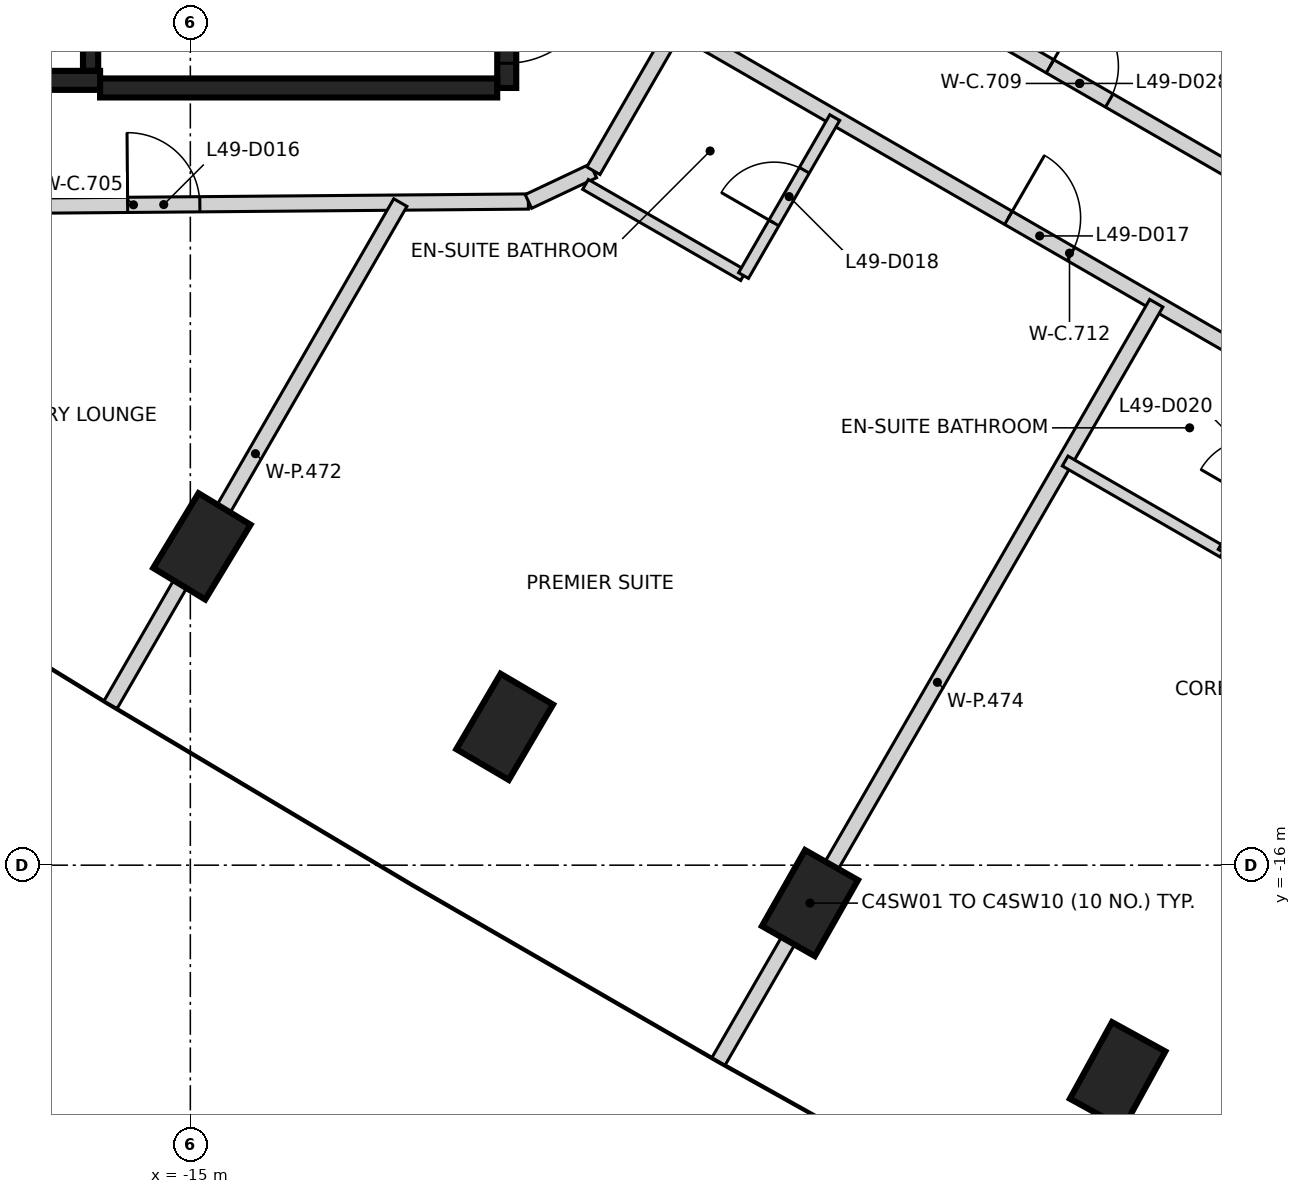
"""IFC4 building model, lengths in metres.
Left out: names, types, materials, properties, quantities, classifications, styles, units other than length and angle.
Written with IfcOpenShell. Run it as: python <this file> out.ifc"""

import sys

from ifc_helpers import new_model, si_unit, direction, frame, frame_2d, origin, origin_2d, place, context, subcontext, project, spatial, rectangle, extrude, element, fill, save


model = new_model("IFC4")
c1 = context("Model", 3, precision=1e-05, world=origin(), true_north=direction((0.0, 1.0)))
c2 = subcontext(c1, "Body", "Model", "MODEL_VIEW")
j1 = project(units=[si_unit("LENGTHUNIT", "METRE"), si_unit("PLANEANGLEUNIT", "RADIAN")], contexts=[c1])
p1 = place(None, origin())
s1 = spatial("IfcSite", under=j1, at=p1, CompositionType="ELEMENT")
p2 = place(p1, origin())
s2 = spatial("IfcBuilding", under=s1, at=p2, CompositionType="ELEMENT")
p3 = place(p2, frame((0.0, 0.0, 197.2)))
s3 = spatial("IfcBuildingStorey", under=s2, at=p3, CompositionType="ELEMENT", Elevation=197.2)
for number, where, z_axis, x_axis in (
    (1, (-14.848, -11.806, -0.35), (0.0, 0.0, 1.0), (0.518, 0.855, 0.0)),
    (2, (-10.864, -14.18, -0.35), (0.0, 0.0, 1.0), (0.506, 0.862, 0.0)),
    (3, (-6.848, -16.499, -0.35), (0.0, 0.0, 1.0), (0.494, 0.87, 0.0)),
    (4, (-2.8, -18.762, -0.35), (0.0, 0.0, 1.0), (0.482, 0.876, 0.0)),
):
    element("IfcColumn", number, at=place(p3, frame(where, z_axis=z_axis, x_axis=x_axis)), inside=s3, PredefinedType="COLUMN", context=c2, shape_type="SweptSolid", body=[
        extrude(rectangle(XDim=1.15, YDim=0.8, at=origin_2d()), origin(), (0.0, 0.0, 1.0), 3.6),
    ])
p4 = place(p3, frame((-10.837, 5.775, 0.0), z_axis=(0.0, 0.0, 1.0), x_axis=(0.0, -1.0, 0.0)))
e5 = element("IfcWall", 5, at=p4, inside=s3, PredefinedType="SHEAR", context=c2, shape_type="SweptSolid", body=[
    extrude(rectangle(XDim=11.55, YDim=0.25, at=frame_2d((5.775, 0.0))), origin(), (0.0, 0.0, 1.0), 3.25),
])
p5 = place(p4, frame((10.025, 0.0, 0.0)))
e6 = element("IfcOpeningElement", 6, at=p5, cuts=e5, PredefinedType="OPENING", context=c2, shape_type="SweptSolid", body=[
    extrude(rectangle(XDim=1.2, YDim=2.1, at=frame_2d((0.6, 1.05))), frame((0.0, 0.135, 0.0), z_axis=(0.0, -1.0, 0.0), x_axis=(1.0, 0.0, 0.0)), (0.0, 0.0, 1.0), 0.27),
])
p6 = place(p4, frame((8.725, 0.0, 0.0)))
e7 = element("IfcOpeningElement", 7, at=p6, cuts=e5, PredefinedType="OPENING", context=c2, shape_type="SweptSolid", body=[
    extrude(rectangle(XDim=1.2, YDim=2.1, at=frame_2d((0.6, 1.05))), frame((0.0, 0.135, 0.0), z_axis=(0.0, -1.0, 0.0), x_axis=(1.0, 0.0, 0.0)), (0.0, 0.0, 1.0), 0.27),
])
p7 = place(p3, frame((-16.187, -5.675, 0.0), z_axis=(0.0, 0.0, 1.0), x_axis=(-1.0, 0.0, 0.0)))
e8 = element("IfcWall", 8, at=p7, inside=s3, PredefinedType="SHEAR", context=c2, shape_type="SweptSolid", body=[
    extrude(rectangle(XDim=6.125, YDim=0.25, at=frame_2d((3.062, 0.0))), origin(), (0.0, 0.0, 1.0), 3.25),
])
p8 = place(p7, frame((3.563, 0.0, 0.0)))
e9 = element("IfcOpeningElement", 9, at=p8, cuts=e8, PredefinedType="OPENING", context=c2, shape_type="SweptSolid", body=[
    extrude(rectangle(XDim=1.0, YDim=2.1, at=frame_2d((0.5, 1.05))), frame((0.0, 0.135, 0.0), z_axis=(0.0, -1.0, 0.0), x_axis=(1.0, 0.0, 0.0)), (0.0, 0.0, 1.0), 0.27),
])
p9 = place(p3, frame((-10.963, -5.775, 0.0), z_axis=(0.0, 0.0, 1.0), x_axis=(-1.0, 0.0, 0.0)))
e10 = element("IfcWall", 10, at=p9, inside=s3, PredefinedType="SHEAR", context=c2, shape_type="SweptSolid", body=[
    extrude(rectangle(XDim=5.225, YDim=0.25, at=frame_2d((2.612, 0.0))), origin(), (0.0, 0.0, 1.0), 3.25),
])
p10 = place(p3, frame((-16.312, -2.898, 0.0), z_axis=(0.0, 0.0, 1.0), x_axis=(0.0, -1.0, 0.0)))
e11 = element("IfcWall", 11, at=p10, inside=s3, PredefinedType="SHEAR", context=c2, shape_type="SweptSolid", body=[
    extrude(rectangle(XDim=2.651, YDim=0.2, at=frame_2d((1.325, 0.0))), origin(), (0.0, 0.0, 1.0), 3.25),
])
p11 = place(p10, frame((0.652, 0.0, 0.0)))
e12 = element("IfcOpeningElement", 12, at=p11, cuts=e11, PredefinedType="OPENING", context=c2, shape_type="SweptSolid", body=[
    extrude(rectangle(XDim=1.3, YDim=2.1, at=frame_2d((0.65, 1.05))), frame((0.0, 0.11, 0.0), z_axis=(0.0, -1.0, 0.0), x_axis=(1.0, 0.0, 0.0)), (0.0, 0.0, 1.0), 0.22),
])
p12 = place(p3, frame((-20.944, -7.356, 0.0), z_axis=(0.0, 0.0, 1.0), x_axis=(0.999964824566, 0.00838746869, 0.0)))
e13 = element("IfcWall", 13, at=p12, inside=s3, PredefinedType="PARTITIONING", context=c2, shape_type="SweptSolid", body=[
    extrude(rectangle(XDim=10.391, YDim=0.2, at=frame_2d((5.196, 0.0))), origin(), (0.0, 0.0, 1.0), 3.25),
])
p13 = place(p12, frame((1.22, 0.0, 0.0)))
e14 = element("IfcOpeningElement", 14, at=p13, cuts=e13, PredefinedType="OPENING", context=c2, shape_type="SweptSolid", body=[
    extrude(rectangle(XDim=0.9, YDim=2.1, at=frame_2d((0.45, 1.05))), frame((0.0, 0.11, 0.0), z_axis=(0.0, -1.0, 0.0), x_axis=(1.0, 0.0, 0.0)), (0.0, 0.0, 1.0), 0.22),
])
p14 = place(p12, frame((5.119, 0.0, 0.0)))
e15 = element("IfcOpeningElement", 15, at=p14, cuts=e13, PredefinedType="OPENING", context=c2, shape_type="SweptSolid", body=[
    extrude(rectangle(XDim=0.95, YDim=2.1, at=frame_2d((0.475, 1.05))), frame((0.0, 0.11, 0.0), z_axis=(0.0, -1.0, 0.0), x_axis=(1.0, 0.0, 0.0)), (0.0, 0.0, 1.0), 0.22),
])
p15 = place(p3, frame((-10.552, -7.268, 0.0), z_axis=(0.0, 0.0, 1.0), x_axis=(0.904331815333, 0.426830139255, 0.0)))
e16 = element("IfcWall", 16, at=p15, inside=s3, PredefinedType="PARTITIONING", context=c2, shape_type="SweptSolid", body=[
    extrude(rectangle(XDim=0.944, YDim=0.2, at=frame_2d((0.472, 0.0))), origin(), (0.0, 0.0, 1.0), 3.25),
])
p16 = place(p3, frame((-9.697, -6.864, 0.0), z_axis=(0.0, 0.0, 1.0), x_axis=(0.499863831834, 0.866104006239, 0.0)))
e17 = element("IfcWall", 17, at=p16, inside=s3, PredefinedType="PARTITIONING", context=c2, shape_type="SweptSolid", body=[
    extrude(rectangle(XDim=2.192, YDim=0.2, at=frame_2d((1.096, 0.0))), origin(), (0.0, 0.0, 1.0), 3.25),
])
p17 = place(p3, frame((-8.612, -2.649, 0.0), z_axis=(0.0, 0.0, 1.0), x_axis=(0.866060983284, -0.499938369435, 0.0)))
e18 = element("IfcWall", 18, at=p17, inside=s3, PredefinedType="PARTITIONING", context=c2, shape_type="SweptSolid", body=[
    extrude(rectangle(XDim=12.268, YDim=0.2, at=frame_2d((6.134, 0.0))), origin(), (0.0, 0.0, 1.0), 3.25),
])
p18 = place(p17, frame((1.463, 0.0, 0.0)))
e19 = element("IfcOpeningElement", 19, at=p18, cuts=e18, PredefinedType="OPENING", context=c2, shape_type="SweptSolid", body=[
    extrude(rectangle(XDim=0.9, YDim=2.1, at=frame_2d((0.45, 1.05))), frame((0.0, 0.11, 0.0), z_axis=(0.0, -1.0, 0.0), x_axis=(1.0, 0.0, 0.0)), (0.0, 0.0, 1.0), 0.22),
])
p19 = place(p17, frame((5.683, 0.0, 0.0)))
e20 = element("IfcOpeningElement", 20, at=p19, cuts=e18, PredefinedType="OPENING", context=c2, shape_type="SweptSolid", body=[
    extrude(rectangle(XDim=0.9, YDim=2.1, at=frame_2d((0.45, 1.05))), frame((0.0, 0.11, 0.0), z_axis=(0.0, -1.0, 0.0), x_axis=(1.0, 0.0, 0.0)), (0.0, 0.0, 1.0), 0.22),
])
p20 = place(p17, frame((9.904, 0.0, 0.0)))
e21 = element("IfcOpeningElement", 21, at=p20, cuts=e18, PredefinedType="OPENING", context=c2, shape_type="SweptSolid", body=[
    extrude(rectangle(XDim=0.9, YDim=2.1, at=frame_2d((0.45, 1.05))), frame((0.0, 0.11, 0.0), z_axis=(0.0, -1.0, 0.0), x_axis=(1.0, 0.0, 0.0)), (0.0, 0.0, 1.0), 0.22),
])
p21 = place(p3, frame((-8.601, -4.965, 0.0), z_axis=(0.0, 0.0, 1.0), x_axis=(0.866011155539, -0.500024677872, 0.0)))
e22 = element("IfcWall", 22, at=p21, inside=s3, PredefinedType="PARTITIONING", context=c2, shape_type="SweptSolid", body=[
    extrude(rectangle(XDim=11.934, YDim=0.2, at=frame_2d((5.967, 0.0))), origin(), (0.0, 0.0, 1.0), 3.25),
])
p22 = place(p21, frame((5.039, 0.0, 0.0)))
e23 = element("IfcOpeningElement", 23, at=p22, cuts=e22, PredefinedType="OPENING", context=c2, shape_type="SweptSolid", body=[
    extrude(rectangle(XDim=0.95, YDim=2.1, at=frame_2d((0.475, 1.05))), frame((0.0, 0.11, 0.0), z_axis=(0.0, -1.0, 0.0), x_axis=(1.0, 0.0, 0.0)), (0.0, 0.0, 1.0), 0.22),
])
p23 = place(p21, frame((10.784, 0.0, 0.0)))
e24 = element("IfcOpeningElement", 24, at=p23, cuts=e22, PredefinedType="OPENING", context=c2, shape_type="SweptSolid", body=[
    extrude(rectangle(XDim=0.95, YDim=2.1, at=frame_2d((0.475, 1.05))), frame((0.0, 0.11, 0.0), z_axis=(0.0, -1.0, 0.0), x_axis=(1.0, 0.0, 0.0)), (0.0, 0.0, 1.0), 0.22),
])
p24 = place(p3, frame((-16.05, -13.89, 0.0), z_axis=(0.0, 0.0, 1.0), x_axis=(0.499849898665, 0.866112047488, 0.0)))
e25 = element("IfcWall", 25, at=p24, inside=s3, PredefinedType="PARTITIONING", context=c2, shape_type="SweptSolid", body=[
    extrude(rectangle(XDim=7.628, YDim=0.2, at=frame_2d((3.814, 0.0))), origin(), (0.0, 0.0, 1.0), 3.25),
])
p25 = place(p3, frame((-8.052, -18.582, 0.0), z_axis=(0.0, 0.0, 1.0), x_axis=(0.500025795397, 0.866010510293, 0.0)))
e26 = element("IfcWall", 26, at=p25, inside=s3, PredefinedType="PARTITIONING", context=c2, shape_type="SweptSolid", body=[
    extrude(rectangle(XDim=11.519, YDim=0.2, at=frame_2d((5.759, 0.0))), origin(), (0.0, 0.0, 1.0), 3.25),
])
p26 = place(p3, frame((-7.6, -0.924, 0.0), z_axis=(0.0, 0.0, 1.0), x_axis=(0.866073324109, -0.499916990376, 0.0)))
e27 = element("IfcWall", 27, at=p26, inside=s3, PredefinedType="PARTITIONING", context=c2, shape_type="SweptSolid", body=[
    extrude(rectangle(XDim=12.24, YDim=0.2, at=frame_2d((6.12, 0.0))), origin(), (0.0, 0.0, 1.0), 3.25),
])
p27 = place(p3, frame((-9.801, -7.044, 0.0), z_axis=(0.0, 0.0, 1.0), x_axis=(0.866277021052, -0.499563932643, 0.0)))
e28 = element("IfcWall", 28, at=p27, inside=s3, PredefinedType="PARTITIONING", context=c2, shape_type="SweptSolid", body=[
    extrude(rectangle(XDim=2.4, YDim=0.15, at=frame_2d((1.2, 0.0))), origin(), (0.0, 0.0, 1.0), 3.25),
])
p28 = place(p3, frame((-7.722, -8.243, 0.0), z_axis=(0.0, 0.0, 1.0), x_axis=(0.500089422704, 0.865973769406, 0.0)))
e29 = element("IfcWall", 29, at=p28, inside=s3, PredefinedType="PARTITIONING", context=c2, shape_type="SweptSolid", body=[
    extrude(rectangle(XDim=2.399, YDim=0.15, at=frame_2d((1.2, 0.0))), origin(), (0.0, 0.0, 1.0), 3.25),
])
p29 = place(p28, frame((0.8, 0.0, 0.0)))
e30 = element("IfcOpeningElement", 30, at=p29, cuts=e29, PredefinedType="OPENING", context=c2, shape_type="SweptSolid", body=[
    extrude(rectangle(XDim=0.8, YDim=2.1, at=frame_2d((0.4, 1.05))), frame((0.0, 0.085, 0.0), z_axis=(0.0, -1.0, 0.0), x_axis=(1.0, 0.0, 0.0)), (0.0, 0.0, 1.0), 0.17),
])
p30 = place(p3, frame((-3.491, -10.683, 0.0), z_axis=(0.0, 0.0, 1.0), x_axis=(0.866249990711, -0.499610802118, 0.0)))
e31 = element("IfcWall", 31, at=p30, inside=s3, PredefinedType="PARTITIONING", context=c2, shape_type="SweptSolid", body=[
    extrude(rectangle(XDim=2.398, YDim=0.15, at=frame_2d((1.199, 0.0))), origin(), (0.0, 0.0, 1.0), 3.25),
])
p31 = place(p3, frame((-1.411, -11.882, 0.0), z_axis=(0.0, 0.0, 1.0), x_axis=(0.49923627015, 0.866465894635, 0.0)))
e32 = element("IfcWall", 32, at=p31, inside=s3, PredefinedType="PARTITIONING", context=c2, shape_type="SweptSolid", body=[
    extrude(rectangle(XDim=2.391, YDim=0.15, at=frame_2d((1.196, 0.0))), origin(), (0.0, 0.0, 1.0), 3.25),
])
p32 = place(p31, frame((0.796, 0.0, 0.0)))
e33 = element("IfcOpeningElement", 33, at=p32, cuts=e32, PredefinedType="OPENING", context=c2, shape_type="SweptSolid", body=[
    extrude(rectangle(XDim=0.8, YDim=2.1, at=frame_2d((0.4, 1.05))), frame((0.0, 0.085, 0.0), z_axis=(0.0, -1.0, 0.0), x_axis=(1.0, 0.0, 0.0)), (0.0, 0.0, 1.0), 0.17),
])
p33 = place(p5, origin())
e34 = element("IfcDoor", 34, at=p33, inside=s3, OperationType="SINGLE_SWING_LEFT", PredefinedType="DOOR", context=c2, shape_type="SweptSolid", body=[
    extrude(rectangle(XDim=1.2, YDim=2.1, at=frame_2d((0.6, 1.05))), frame((0.0, 0.025, 0.0), z_axis=(0.0, -1.0, 0.0), x_axis=(1.0, 0.0, 0.0)), (0.0, 0.0, 1.0), 0.05),
])
fill(e6, e34)
p34 = place(p14, frame((0.95, 0.0, 0.0), z_axis=(0.0, 0.0, 1.0), x_axis=(-1.0, 0.0, 0.0)))
e35 = element("IfcDoor", 35, at=p34, inside=s3, OperationType="SINGLE_SWING_LEFT", PredefinedType="DOOR", context=c2, shape_type="SweptSolid", body=[
    extrude(rectangle(XDim=0.95, YDim=2.1, at=frame_2d((0.475, 1.05))), frame((0.0, 0.025, 0.0), z_axis=(0.0, -1.0, 0.0), x_axis=(1.0, 0.0, 0.0)), (0.0, 0.0, 1.0), 0.05),
])
fill(e15, e35)
p35 = place(p22, frame((0.95, 0.0, 0.0), z_axis=(0.0, 0.0, 1.0), x_axis=(-1.0, 0.0, 0.0)))
e36 = element("IfcDoor", 36, at=p35, inside=s3, OperationType="SINGLE_SWING_LEFT", PredefinedType="DOOR", context=c2, shape_type="SweptSolid", body=[
    extrude(rectangle(XDim=0.95, YDim=2.1, at=frame_2d((0.475, 1.05))), frame((0.0, 0.025, 0.0), z_axis=(0.0, -1.0, 0.0), x_axis=(1.0, 0.0, 0.0)), (0.0, 0.0, 1.0), 0.05),
])
fill(e23, e36)
p36 = place(p29, frame((0.8, 0.0, 0.0), z_axis=(0.0, 0.0, 1.0), x_axis=(-1.0, 0.0, 0.0)))
e37 = element("IfcDoor", 37, at=p36, inside=s3, OperationType="SINGLE_SWING_LEFT", PredefinedType="DOOR", context=c2, shape_type="SweptSolid", body=[
    extrude(rectangle(XDim=0.8, YDim=2.1, at=frame_2d((0.4, 1.05))), frame((0.0, 0.025, 0.0), z_axis=(0.0, -1.0, 0.0), x_axis=(1.0, 0.0, 0.0)), (0.0, 0.0, 1.0), 0.05),
])
fill(e30, e37)
p37 = place(p19, origin())
e38 = element("IfcDoor", 38, at=p37, inside=s3, OperationType="SINGLE_SWING_LEFT", PredefinedType="DOOR", context=c2, shape_type="SweptSolid", body=[
    extrude(rectangle(XDim=0.9, YDim=2.1, at=frame_2d((0.45, 1.05))), frame((0.0, 0.025, 0.0), z_axis=(0.0, -1.0, 0.0), x_axis=(1.0, 0.0, 0.0)), (0.0, 0.0, 1.0), 0.05),
])
fill(e20, e38)
save(model, sys.argv[1])
